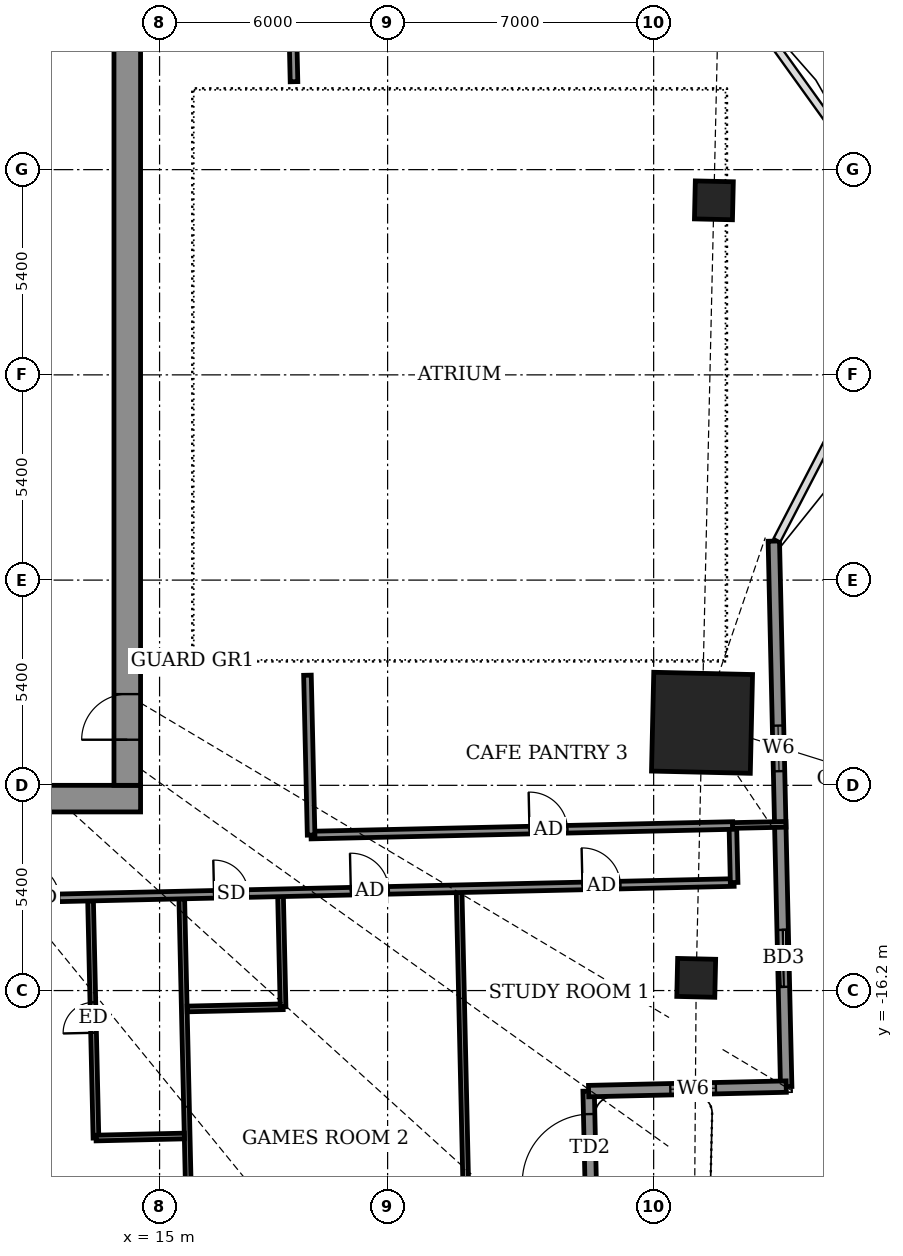
"""IFC4 building model, lengths in metres.
Left out: names, types, materials, properties, quantities, classifications, styles, units other than length and angle.
Written with IfcOpenShell. Run it as: python <this file> out.ifc"""

import sys

from ifc_helpers import new_model, si_unit, direction, frame, frame_2d, origin, origin_2d, place, context, subcontext, project, spatial, rectangle, extrude, element, fill, save


model = new_model("IFC4")
c1 = context("Model", 3, precision=1e-05, world=origin(), true_north=direction((0.0, 1.0)))
c2 = subcontext(c1, "Body", "Model", "MODEL_VIEW")
j1 = project(units=[si_unit("LENGTHUNIT", "METRE"), si_unit("PLANEANGLEUNIT", "RADIAN")], contexts=[c1])
p1 = place(None, origin())
s1 = spatial("IfcSite", under=j1, at=p1, CompositionType="ELEMENT")
p2 = place(p1, origin())
s2 = spatial("IfcBuilding", under=s1, at=p2, CompositionType="ELEMENT")
p3 = place(p2, frame((0.0, 0.0, 275.3)))
s3 = spatial("IfcBuildingStorey", under=s2, at=p3, CompositionType="ELEMENT", Elevation=275.3)
for number, where, z_axis, x_axis in (
    (1, (29.12, -15.866, -0.55), (0.0, 0.0, 1.0), (0.023, 1.0, 0.0)),
    (2, (29.585, 4.592, -0.55), (0.0, 0.0, 1.0), (0.023, 1.0, 0.0)),
):
    element("IfcColumn", number, at=place(p3, frame(where, z_axis=z_axis, x_axis=x_axis)), inside=s3, PredefinedType="COLUMN", context=c2, shape_type="SweptSolid", body=[
        extrude(rectangle(XDim=1.0, YDim=1.0, at=origin_2d()), origin(), (0.0, 0.0, 1.0), 4.6),
    ])
p4 = place(p3, frame((29.273, -9.155, -0.55), z_axis=(0.0, 0.0, 1.0), x_axis=(0.022723627062, 0.999741785049, 0.0)))
e3 = element("IfcColumn", 3, at=p4, inside=s3, PredefinedType="COLUMN", context=c2, shape_type="SweptSolid", body=[
    extrude(rectangle(XDim=2.6, YDim=2.6, at=origin_2d()), origin(), (0.0, 0.0, 1.0), 4.6),
])
p5 = place(p3, frame((31.488, -18.727, 0.0), z_axis=(0.0, 0.0, 1.0), x_axis=(-0.022702091108, 0.999742274318, 0.0)))
e4 = element("IfcWall", 4, at=p5, inside=s3, PredefinedType="SOLIDWALL", context=c2, shape_type="SweptSolid", body=[
    extrude(rectangle(XDim=14.357, YDim=0.3, at=frame_2d((7.178, 0.0))), origin(), (0.0, 0.0, 1.0), 2.35),
])
p6 = place(p5, frame((2.625, 0.0, 0.0)))
e5 = element("IfcOpeningElement", 5, at=p6, cuts=e4, PredefinedType="OPENING", context=c2, shape_type="SweptSolid", body=[
    extrude(rectangle(XDim=1.5, YDim=2.0, at=frame_2d((0.75, 1.0))), frame((0.0, 0.16, 0.0), z_axis=(0.0, -1.0, 0.0), x_axis=(1.0, 0.0, 0.0)), (0.0, 0.0, 1.0), 0.32),
])
p7 = place(p5, frame((8.301, 0.0, 0.5)))
e6 = element("IfcOpeningElement", 6, at=p7, cuts=e4, PredefinedType="OPENING", context=c2, shape_type="SweptSolid", body=[
    extrude(rectangle(XDim=1.2, YDim=1.1, at=frame_2d((0.6, 0.55))), frame((0.0, 0.16, 0.0), z_axis=(0.0, -1.0, 0.0), x_axis=(1.0, 0.0, 0.0)), (0.0, 0.0, 1.0), 0.32),
])
p8 = place(p3, frame((26.407, -24.044, 0.0), z_axis=(0.0, 0.0, 1.0), x_axis=(-0.022675548694, 0.99974287669, 0.0)))
e7 = element("IfcWall", 7, at=p8, inside=s3, PredefinedType="SOLIDWALL", context=c2, shape_type="SweptSolid", body=[
    extrude(rectangle(XDim=5.2, YDim=0.3, at=frame_2d((2.6, 0.0))), origin(), (0.0, 0.0, 1.0), 2.25),
])
p9 = place(p8, frame((2.795, 0.0, 0.0)))
e8 = element("IfcOpeningElement", 8, at=p9, cuts=e7, PredefinedType="OPENING", context=c2, shape_type="SweptSolid", body=[
    extrude(rectangle(XDim=1.8, YDim=2.0, at=frame_2d((0.9, 1.0))), frame((0.0, 0.16, 0.0), z_axis=(0.0, -1.0, 0.0), x_axis=(1.0, 0.0, 0.0)), (0.0, 0.0, 1.0), 0.32),
])
p10 = place(p3, frame((26.289, -18.845, 0.0), z_axis=(0.0, 0.0, 1.0), x_axis=(0.99974287669, 0.022675548694, 0.0)))
e9 = element("IfcWall", 9, at=p10, inside=s3, PredefinedType="SOLIDWALL", context=c2, shape_type="SweptSolid", body=[
    extrude(rectangle(XDim=5.2, YDim=0.3, at=frame_2d((2.6, 0.0))), origin(), (0.0, 0.0, 1.0), 2.25),
])
p11 = place(p10, frame((2.15, 0.0, 0.5)))
e10 = element("IfcOpeningElement", 10, at=p11, cuts=e9, PredefinedType="OPENING", context=c2, shape_type="SweptSolid", body=[
    extrude(rectangle(XDim=1.2, YDim=1.1, at=frame_2d((0.6, 0.55))), frame((0.0, 0.16, 0.0), z_axis=(0.0, -1.0, 0.0), x_axis=(1.0, 0.0, 0.0)), (0.0, 0.0, 1.0), 0.32),
])
p12 = place(p3, frame((15.819, -24.134, 0.0), z_axis=(0.0, 0.0, 1.0), x_axis=(-0.022716582742, 0.999741945138, 0.0)))
e11 = element("IfcWall", 11, at=p12, inside=s3, PredefinedType="PARTITIONING", context=c2, shape_type="SweptSolid", body=[
    extrude(rectangle(XDim=10.35, YDim=0.15, at=frame_2d((5.175, 0.0))), origin(), (0.0, 0.0, 1.0), 2.1),
])
p13 = place(p3, frame((23.117, -23.969, 0.0), z_axis=(0.0, 0.0, 1.0), x_axis=(-0.022690865001, 0.999742529177, 0.0)))
e12 = element("IfcWall", 12, at=p13, inside=s3, PredefinedType="PARTITIONING", context=c2, shape_type="SweptSolid", body=[
    extrude(rectangle(XDim=10.351, YDim=0.15, at=frame_2d((5.175, 0.0))), origin(), (0.0, 0.0, 1.0), 2.25),
])
p14 = place(p3, frame((13.326, -20.08, 0.0), z_axis=(0.0, 0.0, 1.0), x_axis=(-0.02272940328, 0.999741653742, 0.0)))
e13 = element("IfcWall", 13, at=p14, inside=s3, PredefinedType="PARTITIONING", context=c2, shape_type="SweptSolid", body=[
    extrude(rectangle(XDim=6.241, YDim=0.15, at=frame_2d((3.12, 0.0))), origin(), (0.0, 0.0, 1.0), 2.1),
])
p15 = place(p14, frame((2.77, 0.0, 0.0)))
e14 = element("IfcOpeningElement", 14, at=p15, cuts=e13, PredefinedType="OPENING", context=c2, shape_type="SweptSolid", body=[
    extrude(rectangle(XDim=0.8, YDim=2.1, at=frame_2d((0.4, 1.05))), frame((0.0, 0.085, 0.0), z_axis=(0.0, -1.0, 0.0), x_axis=(1.0, 0.0, 0.0)), (0.0, 0.0, 1.0), 0.17),
])
p16 = place(p3, frame((13.328, -20.08, 0.0), z_axis=(0.0, 0.0, 1.0), x_axis=(0.99974031529, 0.022788198363, 0.0)))
e15 = element("IfcWall", 15, at=p16, inside=s3, PredefinedType="PARTITIONING", context=c2, shape_type="SweptSolid", body=[
    extrude(rectangle(XDim=2.325, YDim=0.15, at=frame_2d((1.162, 0.0))), origin(), (0.0, 0.0, 1.0), 2.1),
])
p17 = place(p3, frame((15.727, -16.684, 0.0), z_axis=(0.0, 0.0, 1.0), x_axis=(0.99974392816, 0.022629142889, 0.0)))
e16 = element("IfcWall", 16, at=p17, inside=s3, PredefinedType="PARTITIONING", context=c2, shape_type="SweptSolid", body=[
    extrude(rectangle(XDim=2.525, YDim=0.15, at=frame_2d((1.262, 0.0))), origin(), (0.0, 0.0, 1.0), 2.45),
])
p18 = place(p3, frame((18.249, -16.627, 0.0), z_axis=(0.0, 0.0, 1.0), x_axis=(-0.022732880677, 0.999741574676, 0.0)))
e17 = element("IfcWall", 17, at=p18, inside=s3, PredefinedType="PARTITIONING", context=c2, shape_type="SweptSolid", body=[
    extrude(rectangle(XDim=2.9, YDim=0.15, at=frame_2d((1.45, 0.0))), origin(), (0.0, 0.0, 1.0), 2.25),
])
p19 = place(p3, frame((-23.895, -14.583, 0.0), z_axis=(0.0, 0.0, 1.0), x_axis=(0.999742444101, 0.022694613067, 0.0)))
e18 = element("IfcWall", 18, at=p19, inside=s3, PredefinedType="PARTITIONING", context=c2, shape_type="SweptSolid", body=[
    extrude(rectangle(XDim=54.025, YDim=0.2, at=frame_2d((27.012, 0.0))), origin(), (0.0, 0.0, 1.0), 2.1),
])
p20 = place(p19, frame((0.414, 0.0, 0.0)))
e19 = element("IfcOpeningElement", 19, at=p20, cuts=e18, PredefinedType="OPENING", context=c2, shape_type="SweptSolid", body=[
    extrude(rectangle(XDim=1.0, YDim=2.1, at=frame_2d((0.5, 1.05))), frame((0.0, 0.11, 0.0), z_axis=(0.0, -1.0, 0.0), x_axis=(1.0, 0.0, 0.0)), (0.0, 0.0, 1.0), 0.22),
])
p21 = place(p19, frame((6.289, 0.0, 0.0)))
e20 = element("IfcOpeningElement", 20, at=p21, cuts=e18, PredefinedType="OPENING", context=c2, shape_type="SweptSolid", body=[
    extrude(rectangle(XDim=0.9, YDim=2.1, at=frame_2d((0.45, 1.05))), frame((0.0, 0.11, 0.0), z_axis=(0.0, -1.0, 0.0), x_axis=(1.0, 0.0, 0.0)), (0.0, 0.0, 1.0), 0.22),
])
p22 = place(p19, frame((11.589, 0.0, 0.0)))
e21 = element("IfcOpeningElement", 21, at=p22, cuts=e18, PredefinedType="OPENING", context=c2, shape_type="SweptSolid", body=[
    extrude(rectangle(XDim=1.0, YDim=2.1, at=frame_2d((0.5, 1.05))), frame((0.0, 0.11, 0.0), z_axis=(0.0, -1.0, 0.0), x_axis=(1.0, 0.0, 0.0)), (0.0, 0.0, 1.0), 0.22),
])
p23 = place(p19, frame((8.689, 0.0, 0.0)))
e22 = element("IfcOpeningElement", 22, at=p23, cuts=e18, PredefinedType="OPENING", context=c2, shape_type="SweptSolid", body=[
    extrude(rectangle(XDim=0.9, YDim=2.1, at=frame_2d((0.45, 1.05))), frame((0.0, 0.11, 0.0), z_axis=(0.0, -1.0, 0.0), x_axis=(1.0, 0.0, 0.0)), (0.0, 0.0, 1.0), 0.22),
])
p24 = place(p19, frame((15.014, 0.0, 0.0)))
e23 = element("IfcOpeningElement", 23, at=p24, cuts=e18, PredefinedType="OPENING", context=c2, shape_type="SweptSolid", body=[
    extrude(rectangle(XDim=1.0, YDim=2.1, at=frame_2d((0.5, 1.05))), frame((0.0, 0.11, 0.0), z_axis=(0.0, -1.0, 0.0), x_axis=(1.0, 0.0, 0.0)), (0.0, 0.0, 1.0), 0.22),
])
p25 = place(p19, frame((18.039, 0.0, 0.0)))
e24 = element("IfcOpeningElement", 24, at=p25, cuts=e18, PredefinedType="OPENING", context=c2, shape_type="SweptSolid", body=[
    extrude(rectangle(XDim=0.9, YDim=2.1, at=frame_2d((0.45, 1.05))), frame((0.0, 0.11, 0.0), z_axis=(0.0, -1.0, 0.0), x_axis=(1.0, 0.0, 0.0)), (0.0, 0.0, 1.0), 0.22),
])
p26 = place(p19, frame((22.989, 0.0, 0.0)))
e25 = element("IfcOpeningElement", 25, at=p26, cuts=e18, PredefinedType="OPENING", context=c2, shape_type="SweptSolid", body=[
    extrude(rectangle(XDim=0.9, YDim=2.1, at=frame_2d((0.45, 1.05))), frame((0.0, 0.11, 0.0), z_axis=(0.0, -1.0, 0.0), x_axis=(1.0, 0.0, 0.0)), (0.0, 0.0, 1.0), 0.22),
])
p27 = place(p19, frame((25.514, 0.0, 0.0)))
e26 = element("IfcOpeningElement", 26, at=p27, cuts=e18, PredefinedType="OPENING", context=c2, shape_type="SweptSolid", body=[
    extrude(rectangle(XDim=0.9, YDim=2.1, at=frame_2d((0.45, 1.05))), frame((0.0, 0.11, 0.0), z_axis=(0.0, -1.0, 0.0), x_axis=(1.0, 0.0, 0.0)), (0.0, 0.0, 1.0), 0.22),
])
p28 = place(p19, frame((32.839, 0.0, 0.0)))
e27 = element("IfcOpeningElement", 27, at=p28, cuts=e18, PredefinedType="OPENING", context=c2, shape_type="SweptSolid", body=[
    extrude(rectangle(XDim=0.9, YDim=2.1, at=frame_2d((0.45, 1.05))), frame((0.0, 0.11, 0.0), z_axis=(0.0, -1.0, 0.0), x_axis=(1.0, 0.0, 0.0)), (0.0, 0.0, 1.0), 0.22),
])
p29 = place(p19, frame((35.364, 0.0, 0.0)))
e28 = element("IfcOpeningElement", 28, at=p29, cuts=e18, PredefinedType="OPENING", context=c2, shape_type="SweptSolid", body=[
    extrude(rectangle(XDim=0.9, YDim=2.1, at=frame_2d((0.45, 1.05))), frame((0.0, 0.11, 0.0), z_axis=(0.0, -1.0, 0.0), x_axis=(1.0, 0.0, 0.0)), (0.0, 0.0, 1.0), 0.22),
])
p30 = place(p19, frame((43.939, 0.0, 0.0)))
e29 = element("IfcOpeningElement", 29, at=p30, cuts=e18, PredefinedType="OPENING", context=c2, shape_type="SweptSolid", body=[
    extrude(rectangle(XDim=1.0, YDim=2.1, at=frame_2d((0.5, 1.05))), frame((0.0, 0.11, 0.0), z_axis=(0.0, -1.0, 0.0), x_axis=(1.0, 0.0, 0.0)), (0.0, 0.0, 1.0), 0.22),
])
p31 = place(p19, frame((40.339, 0.0, 0.0)))
e30 = element("IfcOpeningElement", 30, at=p31, cuts=e18, PredefinedType="OPENING", context=c2, shape_type="SweptSolid", body=[
    extrude(rectangle(XDim=0.9, YDim=2.1, at=frame_2d((0.45, 1.05))), frame((0.0, 0.11, 0.0), z_axis=(0.0, -1.0, 0.0), x_axis=(1.0, 0.0, 0.0)), (0.0, 0.0, 1.0), 0.22),
])
p32 = place(p19, frame((50.035, 0.0, 0.0)))
e31 = element("IfcOpeningElement", 31, at=p32, cuts=e18, PredefinedType="OPENING", context=c2, shape_type="SweptSolid", body=[
    extrude(rectangle(XDim=1.0, YDim=2.1, at=frame_2d((0.5, 1.05))), frame((0.0, 0.11, 0.0), z_axis=(0.0, -1.0, 0.0), x_axis=(1.0, 0.0, 0.0)), (0.0, 0.0, 1.0), 0.22),
])
p33 = place(p3, frame((30.118, -13.357, 0.0), z_axis=(0.0, 0.0, 1.0), x_axis=(-0.022617910375, 0.999744182344, 0.0)))
e32 = element("IfcWall", 32, at=p33, inside=s3, PredefinedType="PARTITIONING", context=c2, shape_type="SweptSolid", body=[
    extrude(rectangle(XDim=1.5, YDim=0.2, at=frame_2d((0.75, 0.0))), origin(), (0.0, 0.0, 1.0), 4.05),
])
p34 = place(p3, frame((18.985, -12.109, 0.0), z_axis=(0.0, 0.0, 1.0), x_axis=(0.999742346277, 0.022698921993, 0.0)))
e33 = element("IfcWall", 33, at=p34, inside=s3, PredefinedType="PARTITIONING", context=c2, shape_type="SweptSolid", body=[
    extrude(rectangle(XDim=11.1, YDim=0.2, at=frame_2d((5.55, 0.0))), origin(), (0.0, 0.0, 1.0), 2.35),
])
p35 = place(p34, frame((5.75, 0.0, 0.0)))
e34 = element("IfcOpeningElement", 34, at=p35, cuts=e33, PredefinedType="OPENING", context=c2, shape_type="SweptSolid", body=[
    extrude(rectangle(XDim=1.0, YDim=2.1, at=frame_2d((0.5, 1.05))), frame((0.0, 0.11, 0.0), z_axis=(0.0, -1.0, 0.0), x_axis=(1.0, 0.0, 0.0)), (0.0, 0.0, 1.0), 0.22),
])
p36 = place(p3, frame((18.987, -12.109, 0.0), z_axis=(0.0, 0.0, 1.0), x_axis=(-0.022807092041, 0.999739884446, 0.0)))
e35 = element("IfcWall", 35, at=p36, inside=s3, PredefinedType="PARTITIONING", context=c2, shape_type="SweptSolid", body=[
    extrude(rectangle(XDim=4.207, YDim=0.2, at=frame_2d((2.104, 0.0))), origin(), (0.0, 0.0, 1.0), 2.35),
])
p37 = place(p3, frame((30.078, -11.857, 0.0), z_axis=(0.0, 0.0, 1.0), x_axis=(0.999755917848, 0.022093092321, 0.0)))
e36 = element("IfcWall", 36, at=p37, inside=s3, PredefinedType="PARTITIONING", context=c2, shape_type="SweptSolid", body=[
    extrude(rectangle(XDim=1.403, YDim=0.15, at=frame_2d((0.702, 0.0))), origin(), (0.0, 0.0, 1.0), 2.85),
])
p38 = place(p3, frame((18.537, 7.714, 0.0), z_axis=(0.0, 0.0, 1.0), x_axis=(-0.022773383809, 0.999740652864, 0.0)))
e37 = element("IfcWall", 37, at=p38, inside=s3, PredefinedType="PARTITIONING", context=c2, shape_type="SweptSolid", body=[
    extrude(rectangle(XDim=6.722, YDim=0.2, at=frame_2d((3.361, 0.0))), origin(), (0.0, 0.0, 1.0), 2.35),
])
p39 = place(p3, frame((-14.5, -11.15, 0.0), z_axis=(0.0, 0.0, 1.0), x_axis=(1.0, 0.0, 0.0)))
e38 = element("IfcWall", 38, at=p39, inside=s3, PredefinedType="SHEAR", context=c2, shape_type="SweptSolid", body=[
    extrude(rectangle(XDim=29.0, YDim=0.7, at=frame_2d((14.5, 0.0))), origin(), (0.0, 0.0, 1.0), 4.6),
])
p40 = place(p3, frame((14.15, -10.8, 0.0), z_axis=(0.0, 0.0, 1.0), x_axis=(0.0, 1.0, 0.0)))
e39 = element("IfcWall", 39, at=p40, inside=s3, PredefinedType="SHEAR", context=c2, shape_type="SweptSolid", body=[
    extrude(rectangle(XDim=21.6, YDim=0.7, at=frame_2d((10.8, 0.0))), origin(), (0.0, 0.0, 1.0), 4.6),
])
p41 = place(p40, frame((1.2, 0.0, 0.0)))
e40 = element("IfcOpeningElement", 40, at=p41, cuts=e39, PredefinedType="OPENING", context=c2, shape_type="SweptSolid", body=[
    extrude(rectangle(XDim=1.2, YDim=2.1, at=frame_2d((0.6, 1.05))), frame((0.0, 0.36, 0.0), z_axis=(0.0, -1.0, 0.0), x_axis=(1.0, 0.0, 0.0)), (0.0, 0.0, 1.0), 0.72),
])
p42 = place(p6, origin())
e41 = element("IfcDoor", 41, at=p42, inside=s3, OperationType="SLIDING_TO_LEFT", PredefinedType="DOOR", context=c2, shape_type="SweptSolid", body=[
    extrude(rectangle(XDim=1.5, YDim=2.0, at=frame_2d((0.75, 1.0))), frame((0.0, 0.025, 0.0), z_axis=(0.0, -1.0, 0.0), x_axis=(1.0, 0.0, 0.0)), (0.0, 0.0, 1.0), 0.05),
])
fill(e5, e41)
p43 = place(p7, origin())
e42 = element("IfcWindow", 42, at=p43, inside=s3, PartitioningType="SINGLE_PANEL", PredefinedType="WINDOW", context=c2, shape_type="SweptSolid", body=[
    extrude(rectangle(XDim=1.2, YDim=1.1, at=frame_2d((0.6, 0.55))), frame((0.0, 0.03, 0.0), z_axis=(0.0, -1.0, 0.0), x_axis=(1.0, 0.0, 0.0)), (0.0, 0.0, 1.0), 0.06),
])
fill(e6, e42)
p44 = place(p9, origin())
e43 = element("IfcDoor", 43, at=p44, inside=s3, OperationType="DOUBLE_DOOR_SINGLE_SWING", PredefinedType="DOOR", context=c2, shape_type="SweptSolid", body=[
    extrude(rectangle(XDim=1.8, YDim=2.0, at=frame_2d((0.9, 1.0))), frame((0.0, 0.025, 0.0), z_axis=(0.0, -1.0, 0.0), x_axis=(1.0, 0.0, 0.0)), (0.0, 0.0, 1.0), 0.05),
])
fill(e8, e43)
p45 = place(p11, origin())
e44 = element("IfcWindow", 44, at=p45, inside=s3, PartitioningType="SINGLE_PANEL", PredefinedType="WINDOW", context=c2, shape_type="SweptSolid", body=[
    extrude(rectangle(XDim=1.2, YDim=1.1, at=frame_2d((0.6, 0.55))), frame((0.0, 0.03, 0.0), z_axis=(0.0, -1.0, 0.0), x_axis=(1.0, 0.0, 0.0)), (0.0, 0.0, 1.0), 0.06),
])
fill(e10, e44)
p46 = place(p29, origin())
e45 = element("IfcDoor", 45, at=p46, inside=s3, OperationType="SINGLE_SWING_RIGHT", PredefinedType="DOOR", context=c2, shape_type="SweptSolid", body=[
    extrude(rectangle(XDim=0.9, YDim=2.1, at=frame_2d((0.45, 1.05))), frame((0.0, 0.025, 0.0), z_axis=(0.0, -1.0, 0.0), x_axis=(1.0, 0.0, 0.0)), (0.0, 0.0, 1.0), 0.05),
])
fill(e28, e45)
p47 = place(p15, origin())
e46 = element("IfcDoor", 46, at=p47, inside=s3, OperationType="SINGLE_SWING_RIGHT", PredefinedType="DOOR", context=c2, shape_type="SweptSolid", body=[
    extrude(rectangle(XDim=0.8, YDim=2.1, at=frame_2d((0.4, 1.05))), frame((0.0, 0.025, 0.0), z_axis=(0.0, -1.0, 0.0), x_axis=(1.0, 0.0, 0.0)), (0.0, 0.0, 1.0), 0.05),
])
fill(e14, e46)
p48 = place(p30, origin())
e47 = element("IfcDoor", 47, at=p48, inside=s3, OperationType="SINGLE_SWING_RIGHT", PredefinedType="DOOR", context=c2, shape_type="SweptSolid", body=[
    extrude(rectangle(XDim=1.0, YDim=2.1, at=frame_2d((0.5, 1.05))), frame((0.0, 0.025, 0.0), z_axis=(0.0, -1.0, 0.0), x_axis=(1.0, 0.0, 0.0)), (0.0, 0.0, 1.0), 0.05),
])
fill(e29, e47)
p49 = place(p31, origin())
e48 = element("IfcDoor", 48, at=p49, inside=s3, OperationType="SINGLE_SWING_RIGHT", PredefinedType="DOOR", context=c2, shape_type="SweptSolid", body=[
    extrude(rectangle(XDim=0.9, YDim=2.1, at=frame_2d((0.45, 1.05))), frame((0.0, 0.025, 0.0), z_axis=(0.0, -1.0, 0.0), x_axis=(1.0, 0.0, 0.0)), (0.0, 0.0, 1.0), 0.05),
])
fill(e30, e48)
p50 = place(p32, origin())
e49 = element("IfcDoor", 49, at=p50, inside=s3, OperationType="SINGLE_SWING_LEFT", PredefinedType="DOOR", context=c2, shape_type="SweptSolid", body=[
    extrude(rectangle(XDim=1.0, YDim=2.1, at=frame_2d((0.5, 1.05))), frame((0.0, 0.025, 0.0), z_axis=(0.0, -1.0, 0.0), x_axis=(1.0, 0.0, 0.0)), (0.0, 0.0, 1.0), 0.05),
])
fill(e31, e49)
p51 = place(p35, origin())
e50 = element("IfcDoor", 50, at=p51, inside=s3, OperationType="SINGLE_SWING_RIGHT", PredefinedType="DOOR", context=c2, shape_type="SweptSolid", body=[
    extrude(rectangle(XDim=1.0, YDim=2.1, at=frame_2d((0.5, 1.05))), frame((0.0, 0.025, 0.0), z_axis=(0.0, -1.0, 0.0), x_axis=(1.0, 0.0, 0.0)), (0.0, 0.0, 1.0), 0.05),
])
fill(e34, e50)
p52 = place(p41, origin())
e51 = element("IfcDoor", 51, at=p52, inside=s3, OperationType="DOUBLE_DOOR_SINGLE_SWING", PredefinedType="DOOR", context=c2, shape_type="SweptSolid", body=[
    extrude(rectangle(XDim=1.2, YDim=2.1, at=frame_2d((0.6, 1.05))), frame((0.0, 0.025, 0.0), z_axis=(0.0, -1.0, 0.0), x_axis=(1.0, 0.0, 0.0)), (0.0, 0.0, 1.0), 0.05),
])
fill(e40, e51)
save(model, sys.argv[1])
